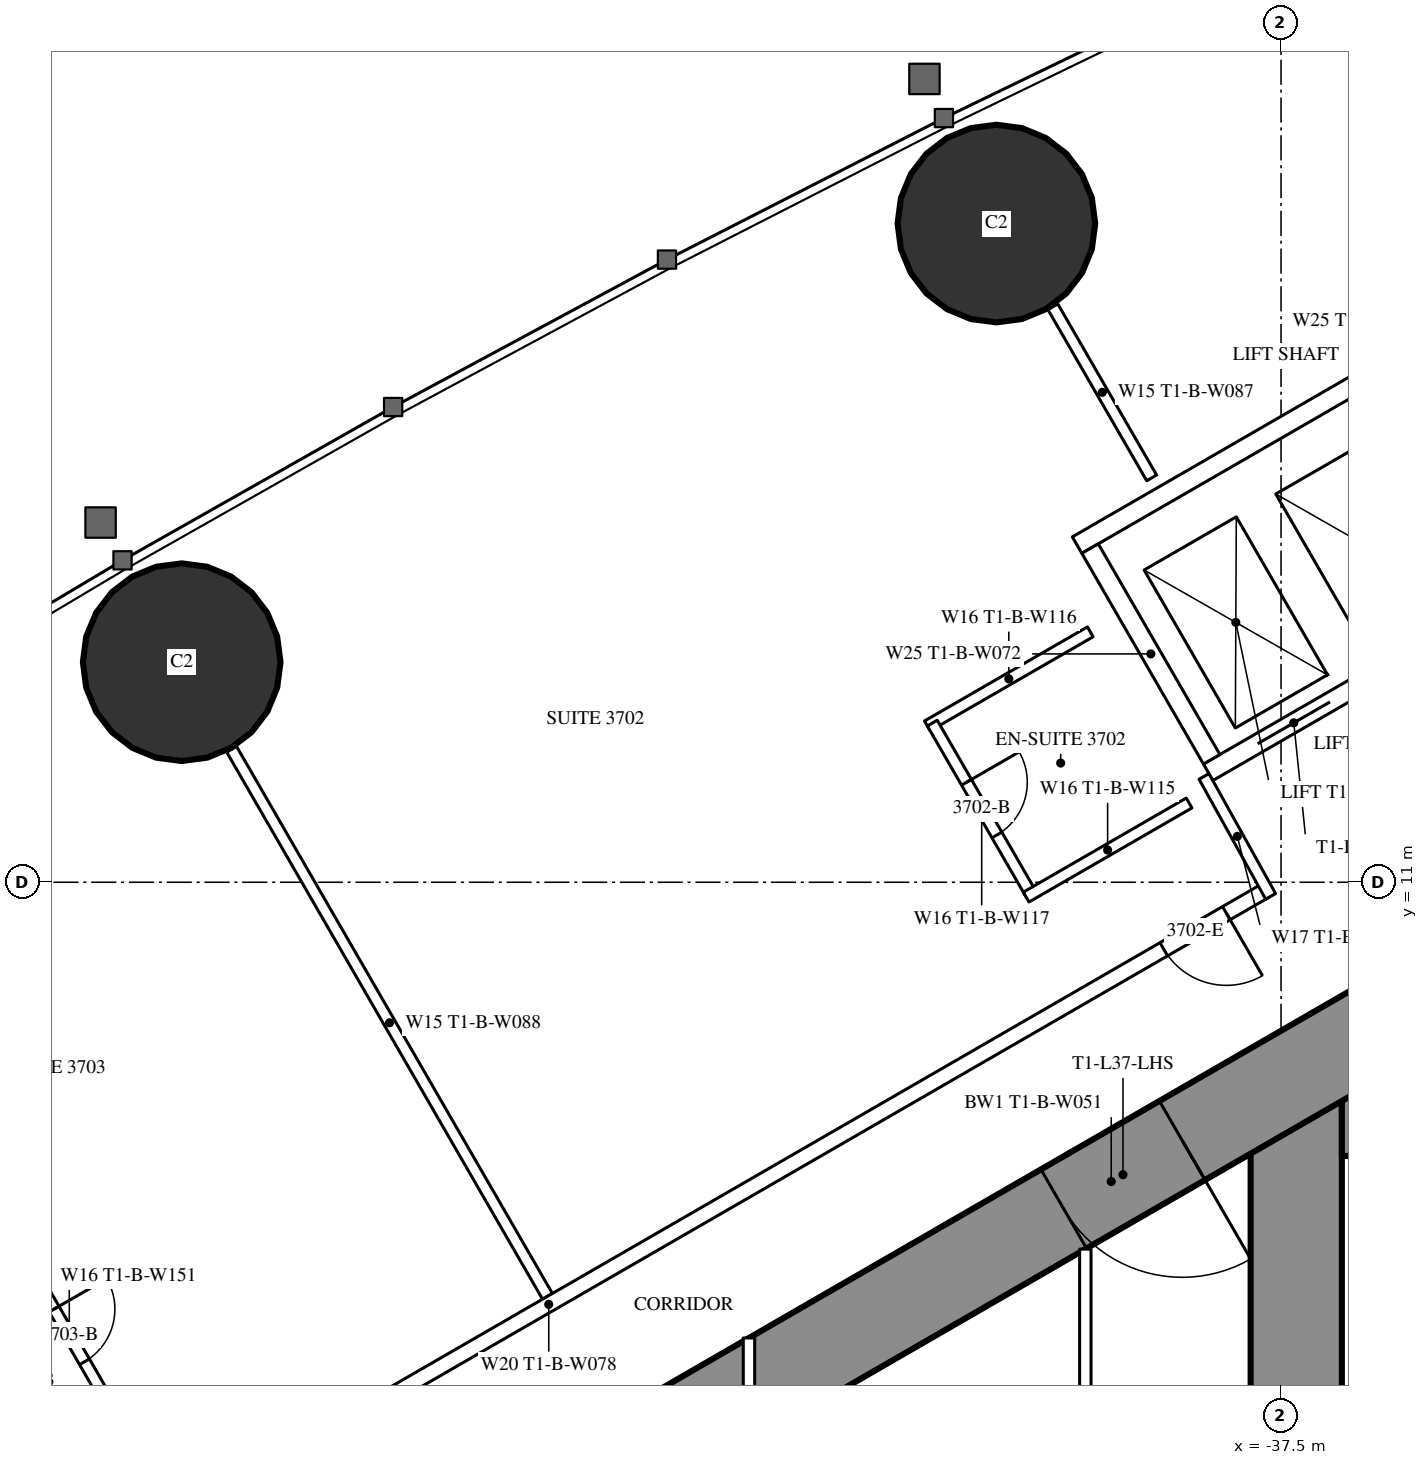
"""IFC4 building model, lengths in metres.
Left out: names, types, materials, properties, quantities, classifications, styles, units other than length and angle.
Written with IfcOpenShell. Run it as: python <this file> out.ifc"""

import sys

from ifc_helpers import new_model, si_unit, direction, frame, frame_2d, origin, origin_2d, place, context, subcontext, project, spatial, rectangle, hollow_circle, extrude, element, fill, save


model = new_model("IFC4")
c1 = context("Model", 3, precision=1e-05, world=origin(), true_north=direction((0.0, 1.0)))
c2 = subcontext(c1, "Body", "Model", "MODEL_VIEW")
j1 = project(units=[si_unit("LENGTHUNIT", "METRE"), si_unit("PLANEANGLEUNIT", "RADIAN")], contexts=[c1])
p1 = place(None, origin())
s1 = spatial("IfcSite", under=j1, at=p1, CompositionType="ELEMENT")
p2 = place(p1, origin())
s2 = spatial("IfcBuilding", under=s1, at=p2, CompositionType="ELEMENT")
p3 = place(p2, frame((0.0, 0.0, 139.6)))
s3 = spatial("IfcBuildingStorey", under=s2, at=p3, CompositionType="ELEMENT", Elevation=139.6)
for number, where, z_axis, x_axis in (
    (1, (-41.245, 19.666, 0.0), (0.0, 0.0, 1.0), (1.0, 0.0, 0.0)),
    (2, (-51.963, 13.895, 0.0), (0.0, 0.0, 1.0), (1.0, 0.0, 0.0)),
):
    element("IfcColumn", number, at=place(p3, frame(where, z_axis=z_axis, x_axis=x_axis)), inside=s3, PredefinedType="COLUMN", context=c2, shape_type="SweptSolid", body=[
        extrude(hollow_circle(Radius=1.3, WallThickness=0.1, at=origin_2d()), origin(), (0.0, 0.0, 1.0), 3.5),
    ])
p4 = place(p3, frame((-37.3, 8.6, 0.0), z_axis=(0.0, 0.0, 1.0), x_axis=(0.0, -1.0, 0.0)))
e3 = element("IfcWall", 3, at=p4, inside=s3, PredefinedType="SHEAR", context=c2, shape_type="SweptSolid", body=[
    extrude(rectangle(XDim=17.2, YDim=1.2, at=frame_2d((8.6, 0.0))), origin(), (0.0, 0.0, 1.0), 3.5),
])
p5 = place(p4, frame((7.7, 0.0, 0.0)))
e4 = element("IfcOpeningElement", 4, at=p5, cuts=e3, PredefinedType="OPENING", context=c2, shape_type="SweptSolid", body=[
    extrude(rectangle(XDim=1.8, YDim=2.2, at=frame_2d((0.9, 1.1))), frame((0.0, 0.61, 0.0), z_axis=(0.0, -1.0, 0.0), x_axis=(1.0, 0.0, 0.0)), (0.0, 0.0, 1.0), 1.22),
])
p6 = place(p3, frame((-28.3, 8.0, 0.0), z_axis=(0.0, 0.0, 1.0), x_axis=(-1.0, 0.0, 0.0)))
e5 = element("IfcWall", 5, at=p6, inside=s3, PredefinedType="SHEAR", context=c2, shape_type="SweptSolid", body=[
    extrude(rectangle(XDim=8.4, YDim=1.2, at=frame_2d((4.2, 0.0))), origin(), (0.0, 0.0, 1.0), 3.5),
])
p7 = place(p6, frame((0.25, 0.0, 0.0)))
e6 = element("IfcOpeningElement", 6, at=p7, cuts=e5, PredefinedType="OPENING", context=c2, shape_type="SweptSolid", body=[
    extrude(rectangle(XDim=1.0, YDim=2.2, at=frame_2d((0.5, 1.1))), frame((0.0, 0.61, 0.0), z_axis=(0.0, -1.0, 0.0), x_axis=(1.0, 0.0, 0.0)), (0.0, 0.0, 1.0), 1.22),
])
p8 = place(p3, frame((-27.2, 14.3, 0.0), z_axis=(0.0, 0.0, 1.0), x_axis=(-0.866026593062, -0.499997940104, 0.0)))
e7 = element("IfcWall", 7, at=p8, inside=s3, PredefinedType="SHEAR", context=c2, shape_type="SweptSolid", body=[
    extrude(rectangle(XDim=28.946, YDim=1.2, at=frame_2d((14.473, 0.0))), origin(), (0.0, 0.0, 1.0), 3.5),
])
p9 = place(p8, frame((4.6, 0.0, 0.0)))
e8 = element("IfcOpeningElement", 8, at=p9, cuts=e7, PredefinedType="OPENING", context=c2, shape_type="SweptSolid", body=[
    extrude(rectangle(XDim=1.0, YDim=2.2, at=frame_2d((0.5, 1.1))), frame((0.0, 0.61, 0.0), z_axis=(0.0, -1.0, 0.0), x_axis=(1.0, 0.0, 0.0)), (0.0, 0.0, 1.0), 1.22),
])
p10 = place(p8, frame((13.395, 0.0, 0.0)))
e9 = element("IfcOpeningElement", 9, at=p10, cuts=e7, PredefinedType="OPENING", context=c2, shape_type="SweptSolid", body=[
    extrude(rectangle(XDim=1.8, YDim=2.2, at=frame_2d((0.9, 1.1))), frame((0.0, 0.61, 0.0), z_axis=(0.0, -1.0, 0.0), x_axis=(1.0, 0.0, 0.0)), (0.0, 0.0, 1.0), 1.22),
])
p11 = place(p3, frame((-47.151, 5.552, 0.0), z_axis=(0.0, 0.0, 1.0), x_axis=(-0.500003012045, 0.866023664773, 0.0)))
e10 = element("IfcWall", 10, at=p11, inside=s3, PredefinedType="PARTITIONING", context=c2, shape_type="SweptSolid", body=[
    extrude(rectangle(XDim=8.311, YDim=0.15, at=frame_2d((4.156, 0.0))), origin(), (0.0, 0.0, 1.0), 2.2),
])
p12 = place(p3, frame((-39.202, 16.32, 0.0), z_axis=(0.0, 0.0, 1.0), x_axis=(-0.499947391036, 0.866055775454, 0.0)))
e11 = element("IfcWall", 11, at=p12, inside=s3, PredefinedType="PARTITIONING", context=c2, shape_type="SweptSolid", body=[
    extrude(rectangle(XDim=2.599, YDim=0.15, at=frame_2d((1.3, 0.0))), origin(), (0.0, 0.0, 1.0), 3.25),
])
p13 = place(p3, frame((-37.7, 10.894, 0.0), z_axis=(0.0, 0.0, 1.0), x_axis=(-0.866027905338, -0.499995667157, 0.0)))
e12 = element("IfcWall", 12, at=p13, inside=s3, PredefinedType="PARTITIONING", context=c2, shape_type="SweptSolid", body=[
    extrude(rectangle(XDim=21.787, YDim=0.2, at=frame_2d((10.894, 0.0))), origin(), (0.0, 0.0, 1.0), 3.25),
])
p14 = place(p13, frame((17.711, 0.0, 0.0)))
e13 = element("IfcOpeningElement", 13, at=p14, cuts=e12, PredefinedType="OPENING", context=c2, shape_type="SweptSolid", body=[
    extrude(rectangle(XDim=0.95, YDim=2.2, at=frame_2d((0.475, 1.1))), frame((0.0, 0.11, 0.0), z_axis=(0.0, -1.0, 0.0), x_axis=(1.0, 0.0, 0.0)), (0.0, 0.0, 1.0), 0.22),
])
p15 = place(p13, frame((19.399, 0.0, 0.0)))
e14 = element("IfcOpeningElement", 14, at=p15, cuts=e12, PredefinedType="OPENING", context=c2, shape_type="SweptSolid", body=[
    extrude(rectangle(XDim=1.8, YDim=2.2, at=frame_2d((0.9, 1.1))), frame((0.0, 0.11, 0.0), z_axis=(0.0, -1.0, 0.0), x_axis=(1.0, 0.0, 0.0)), (0.0, 0.0, 1.0), 0.22),
])
p16 = place(p13, frame((0.6, 0.0, 0.0)))
e15 = element("IfcOpeningElement", 15, at=p16, cuts=e12, PredefinedType="OPENING", context=c2, shape_type="SweptSolid", body=[
    extrude(rectangle(XDim=0.95, YDim=2.2, at=frame_2d((0.475, 1.1))), frame((0.0, 0.11, 0.0), z_axis=(0.0, -1.0, 0.0), x_axis=(1.0, 0.0, 0.0)), (0.0, 0.0, 1.0), 0.22),
])
p17 = place(p3, frame((-38.513, 12.392, 0.0), z_axis=(0.0, 0.0, 1.0), x_axis=(0.485585508183, -0.874189175317, 0.0)))
e16 = element("IfcWall", 16, at=p17, inside=s3, PredefinedType="PARTITIONING", context=c2, shape_type="SweptSolid", body=[
    extrude(rectangle(XDim=1.805, YDim=0.15, at=frame_2d((0.902, 0.0))), origin(), (0.0, 0.0, 1.0), 3.25),
])
p18 = place(p3, frame((-52.792, 3.912, 0.0), z_axis=(0.0, 0.0, 1.0), x_axis=(-0.500006934395, 0.866021400173, 0.0)))
e17 = element("IfcWall", 17, at=p18, inside=s3, PredefinedType="PARTITIONING", context=c2, shape_type="SweptSolid", body=[
    extrude(rectangle(XDim=2.6, YDim=0.15, at=frame_2d((1.3, 0.0))), origin(), (0.0, 0.0, 1.0), 3.25),
])
p19 = place(p18, frame((0.9, 0.0, 0.0)))
e18 = element("IfcOpeningElement", 18, at=p19, cuts=e17, PredefinedType="OPENING", context=c2, shape_type="SweptSolid", body=[
    extrude(rectangle(XDim=0.8, YDim=2.2, at=frame_2d((0.4, 1.1))), frame((0.0, 0.085, 0.0), z_axis=(0.0, -1.0, 0.0), x_axis=(1.0, 0.0, 0.0)), (0.0, 0.0, 1.0), 0.17),
])
p20 = place(p3, frame((-40.01, 14.294, 0.0), z_axis=(0.0, 0.0, 1.0), x_axis=(-0.866031185235, -0.4999899861, 0.0)))
e19 = element("IfcWall", 19, at=p20, inside=s3, PredefinedType="PARTITIONING", context=c2, shape_type="SweptSolid", body=[
    extrude(rectangle(XDim=2.475, YDim=0.15, at=frame_2d((1.238, 0.0))), origin(), (0.0, 0.0, 1.0), 3.25),
])
p21 = place(p3, frame((-40.788, 10.843, 0.0), z_axis=(0.0, 0.0, 1.0), x_axis=(-0.500006934395, 0.866021400173, 0.0)))
e20 = element("IfcWall", 20, at=p21, inside=s3, PredefinedType="PARTITIONING", context=c2, shape_type="SweptSolid", body=[
    extrude(rectangle(XDim=2.6, YDim=0.15, at=frame_2d((1.3, 0.0))), origin(), (0.0, 0.0, 1.0), 3.25),
])
p22 = place(p21, frame((0.9, 0.0, 0.0)))
e21 = element("IfcOpeningElement", 21, at=p22, cuts=e20, PredefinedType="OPENING", context=c2, shape_type="SweptSolid", body=[
    extrude(rectangle(XDim=0.8, YDim=2.2, at=frame_2d((0.4, 1.1))), frame((0.0, 0.085, 0.0), z_axis=(0.0, -1.0, 0.0), x_axis=(1.0, 0.0, 0.0)), (0.0, 0.0, 1.0), 0.17),
])
p23 = place(p3, frame((-38.71, 12.042, 0.0), z_axis=(0.0, 0.0, 1.0), x_axis=(-0.86604923931, -0.499958713387, 0.0)))
e22 = element("IfcWall", 22, at=p23, inside=s3, PredefinedType="PARTITIONING", context=c2, shape_type="SweptSolid", body=[
    extrude(rectangle(XDim=2.475, YDim=0.15, at=frame_2d((1.237, 0.0))), origin(), (0.0, 0.0, 1.0), 3.25),
])
p24 = place(p3, frame((-40.075, 6.174, 0.0), z_axis=(0.0, 0.0, 1.0), x_axis=(0.0, -1.0, 0.0)))
e23 = element("IfcWall", 23, at=p24, inside=s3, PredefinedType="PARTITIONING", context=c2, shape_type="SweptSolid", body=[
    extrude(rectangle(XDim=7.374, YDim=0.15, at=frame_2d((3.687, 0.0))), origin(), (0.0, 0.0, 1.0), 3.25),
])
p25 = place(p24, frame((2.787, 0.0, 0.0)))
e24 = element("IfcOpeningElement", 24, at=p25, cuts=e23, PredefinedType="OPENING", context=c2, shape_type="SweptSolid", body=[
    extrude(rectangle(XDim=1.8, YDim=2.2, at=frame_2d((0.9, 1.1))), frame((0.0, 0.085, 0.0), z_axis=(0.0, -1.0, 0.0), x_axis=(1.0, 0.0, 0.0)), (0.0, 0.0, 1.0), 0.17),
])
p26 = place(p3, frame((-44.5, 5.005, 0.0), z_axis=(0.0, 0.0, 1.0), x_axis=(0.0, -1.0, 0.0)))
e25 = element("IfcWall", 25, at=p26, inside=s3, PredefinedType="PARTITIONING", context=c2, shape_type="SweptSolid", body=[
    extrude(rectangle(XDim=10.009, YDim=0.15, at=frame_2d((5.005, 0.0))), origin(), (0.0, 0.0, 1.0), 2.45),
])
p27 = place(p26, frame((4.505, 0.0, 0.0)))
e26 = element("IfcOpeningElement", 26, at=p27, cuts=e25, PredefinedType="OPENING", context=c2, shape_type="SweptSolid", body=[
    extrude(rectangle(XDim=1.0, YDim=2.2, at=frame_2d((0.5, 1.1))), frame((0.0, 0.085, 0.0), z_axis=(0.0, -1.0, 0.0), x_axis=(1.0, 0.0, 0.0)), (0.0, 0.0, 1.0), 0.17),
])
p28 = place(p3, frame((-31.01, 16.747, 0.0), z_axis=(0.0, 0.0, 1.0), x_axis=(-0.866028165386, -0.499995216735, 0.0)))
e27 = element("IfcWall", 27, at=p28, inside=s3, PredefinedType="PARTITIONING", context=c2, shape_type="SweptSolid", body=[
    extrude(rectangle(XDim=8.6, YDim=0.25, at=frame_2d((4.3, 0.0))), origin(), (0.0, 0.0, 1.0), 3.25),
])
p29 = place(p28, frame((0.75, 0.0, 0.0)))
e28 = element("IfcOpeningElement", 28, at=p29, cuts=e27, PredefinedType="OPENING", context=c2, shape_type="SweptSolid", body=[
    extrude(rectangle(XDim=1.1, YDim=2.2, at=frame_2d((0.55, 1.1))), frame((0.0, 0.135, 0.0), z_axis=(0.0, -1.0, 0.0), x_axis=(1.0, 0.0, 0.0)), (0.0, 0.0, 1.0), 0.27),
])
p30 = place(p28, frame((2.75, 0.0, 0.0)))
e29 = element("IfcOpeningElement", 29, at=p30, cuts=e27, PredefinedType="OPENING", context=c2, shape_type="SweptSolid", body=[
    extrude(rectangle(XDim=1.1, YDim=2.2, at=frame_2d((0.55, 1.1))), frame((0.0, 0.135, 0.0), z_axis=(0.0, -1.0, 0.0), x_axis=(1.0, 0.0, 0.0)), (0.0, 0.0, 1.0), 0.27),
])
p31 = place(p28, frame((4.75, 0.0, 0.0)))
e30 = element("IfcOpeningElement", 30, at=p31, cuts=e27, PredefinedType="OPENING", context=c2, shape_type="SweptSolid", body=[
    extrude(rectangle(XDim=1.1, YDim=2.2, at=frame_2d((0.55, 1.1))), frame((0.0, 0.135, 0.0), z_axis=(0.0, -1.0, 0.0), x_axis=(1.0, 0.0, 0.0)), (0.0, 0.0, 1.0), 0.27),
])
p32 = place(p28, frame((6.75, 0.0, 0.0)))
e31 = element("IfcOpeningElement", 31, at=p32, cuts=e27, PredefinedType="OPENING", context=c2, shape_type="SweptSolid", body=[
    extrude(rectangle(XDim=1.1, YDim=2.2, at=frame_2d((0.55, 1.1))), frame((0.0, 0.135, 0.0), z_axis=(0.0, -1.0, 0.0), x_axis=(1.0, 0.0, 0.0)), (0.0, 0.0, 1.0), 0.27),
])
p33 = place(p3, frame((-32.736, 19.736, 0.0), z_axis=(0.0, 0.0, 1.0), x_axis=(-0.866028165386, -0.499995216735, 0.0)))
e32 = element("IfcWall", 32, at=p33, inside=s3, PredefinedType="PARTITIONING", context=c2, shape_type="SweptSolid", body=[
    extrude(rectangle(XDim=8.6, YDim=0.25, at=frame_2d((4.3, 0.0))), origin(), (0.0, 0.0, 1.0), 3.25),
])
p34 = place(p3, frame((-38.413, 12.618, 0.0), z_axis=(0.0, 0.0, 1.0), x_axis=(-0.499872130319, 0.866099216793, 0.0)))
e33 = element("IfcWall", 33, at=p34, inside=s3, PredefinedType="PARTITIONING", context=c2, shape_type="SweptSolid", body=[
    extrude(rectangle(XDim=3.2, YDim=0.25, at=frame_2d((1.6, 0.0))), origin(), (0.0, 0.0, 1.0), 3.25),
])
p35 = place(p19, origin())
e34 = element("IfcDoor", 34, at=p35, inside=s3, OperationType="SINGLE_SWING_RIGHT", PredefinedType="DOOR", context=c2, shape_type="SweptSolid", body=[
    extrude(rectangle(XDim=0.8, YDim=2.2, at=frame_2d((0.4, 1.1))), frame((0.0, 0.025, 0.0), z_axis=(0.0, -1.0, 0.0), x_axis=(1.0, 0.0, 0.0)), (0.0, 0.0, 1.0), 0.05),
])
fill(e18, e34)
p36 = place(p22, origin())
e35 = element("IfcDoor", 35, at=p36, inside=s3, OperationType="SINGLE_SWING_RIGHT", PredefinedType="DOOR", context=c2, shape_type="SweptSolid", body=[
    extrude(rectangle(XDim=0.8, YDim=2.2, at=frame_2d((0.4, 1.1))), frame((0.0, 0.025, 0.0), z_axis=(0.0, -1.0, 0.0), x_axis=(1.0, 0.0, 0.0)), (0.0, 0.0, 1.0), 0.05),
])
fill(e21, e35)
p37 = place(p16, origin())
e36 = element("IfcDoor", 36, at=p37, inside=s3, OperationType="SINGLE_SWING_LEFT", PredefinedType="DOOR", context=c2, shape_type="SweptSolid", body=[
    extrude(rectangle(XDim=0.95, YDim=2.2, at=frame_2d((0.475, 1.1))), frame((0.0, 0.025, 0.0), z_axis=(0.0, -1.0, 0.0), x_axis=(1.0, 0.0, 0.0)), (0.0, 0.0, 1.0), 0.05),
])
fill(e15, e36)
p38 = place(p10, origin())
e37 = element("IfcDoor", 37, at=p38, inside=s3, OperationType="DOUBLE_DOOR_SINGLE_SWING", PredefinedType="DOOR", context=c2, shape_type="SweptSolid", body=[
    extrude(rectangle(XDim=1.8, YDim=2.2, at=frame_2d((0.9, 1.1))), frame((0.0, 0.025, 0.0), z_axis=(0.0, -1.0, 0.0), x_axis=(1.0, 0.0, 0.0)), (0.0, 0.0, 1.0), 0.05),
])
fill(e9, e37)
p39 = place(p32, origin())
e38 = element("IfcDoor", 38, at=p39, inside=s3, OperationType="DOUBLE_DOOR_SLIDING", PredefinedType="USERDEFINED", context=c2, shape_type="SweptSolid", body=[
    extrude(rectangle(XDim=1.1, YDim=2.2, at=frame_2d((0.55, 1.1))), frame((0.0, 0.025, 0.0), z_axis=(0.0, -1.0, 0.0), x_axis=(1.0, 0.0, 0.0)), (0.0, 0.0, 1.0), 0.05),
])
fill(e31, e38)
save(model, sys.argv[1])
